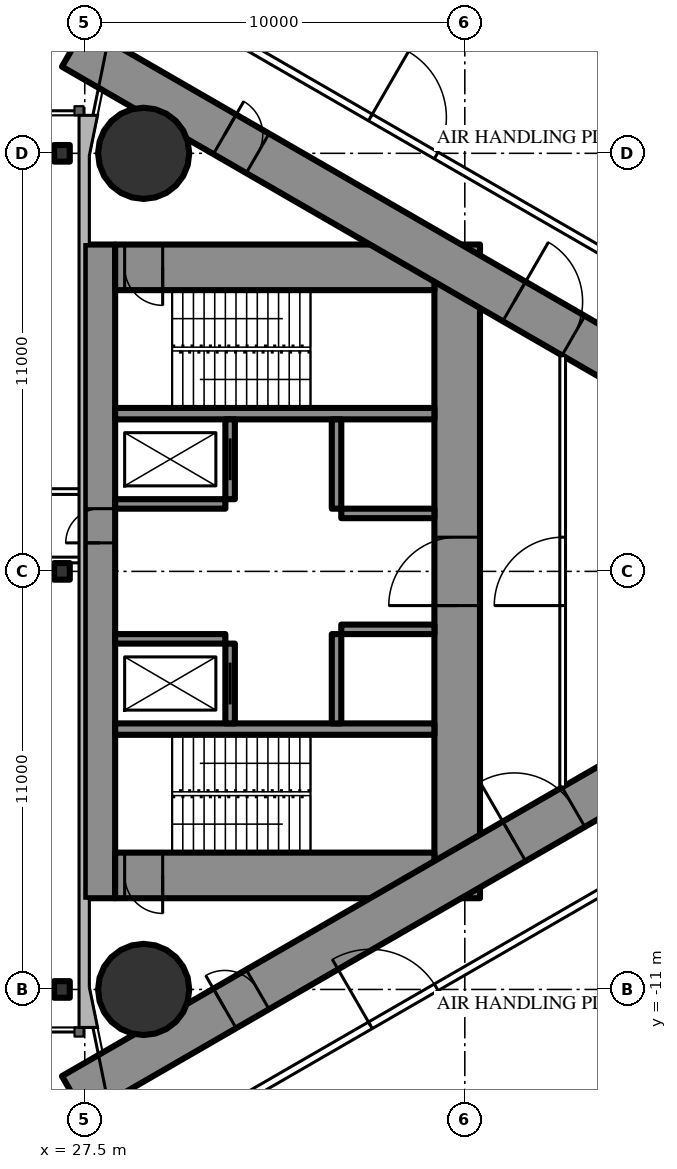
"""IFC4 building model, lengths in metres.
Left out: names, types, materials, properties, quantities, classifications, styles, units other than length and angle.
Written with IfcOpenShell. Run it as: python <this file> out.ifc"""

import sys

from ifc_helpers import new_model, si_unit, direction, frame, frame_2d, origin, origin_2d, place, context, subcontext, project, spatial, rectangle, circle, i_section, extrude, element, fill, save


model = new_model("IFC4")
c1 = context("Model", 3, precision=1e-05, world=origin(), true_north=direction((0.0, 1.0)))
c2 = subcontext(c1, "Body", "Model", "MODEL_VIEW")
j1 = project(units=[si_unit("LENGTHUNIT", "METRE"), si_unit("PLANEANGLEUNIT", "RADIAN")], contexts=[c1])
p1 = place(None, origin())
s1 = spatial("IfcSite", under=j1, at=p1, CompositionType="ELEMENT")
p2 = place(p1, origin())
s2 = spatial("IfcBuilding", under=s1, at=p2, CompositionType="ELEMENT")
p3 = place(p2, frame((0.0, 0.0, 263.3)))
s3 = spatial("IfcBuildingStorey", under=s2, at=p3, CompositionType="ELEMENT", Elevation=263.3)
for number, where, z_axis, x_axis in (
    (1, (29.05, 11.0, 0.0), (0.0, 0.0, 1.0), (1.0, 0.0, 0.0)),
    (2, (29.05, -11.0, 0.0), (0.0, 0.0, 1.0), (1.0, 0.0, 0.0)),
):
    element("IfcColumn", number, at=place(p3, frame(where, z_axis=z_axis, x_axis=x_axis)), inside=s3, PredefinedType="COLUMN", context=c2, shape_type="SweptSolid", body=[
        extrude(circle(Radius=1.2, at=origin_2d()), origin(), (0.0, 0.0, 1.0), 5.0),
    ])
p4 = place(p3, frame((27.9, -8.6, 0.0), z_axis=(0.0, 0.0, 1.0), x_axis=(0.0, 1.0, 0.0)))
e3 = element("IfcWall", 3, at=p4, inside=s3, PredefinedType="SHEAR", context=c2, shape_type="SweptSolid", body=[
    extrude(rectangle(XDim=17.2, YDim=0.8, at=frame_2d((8.6, 0.0))), origin(), (0.0, 0.0, 1.0), 5.0),
])
p5 = place(p4, frame((9.35, 0.0, 0.0)))
e4 = element("IfcOpeningElement", 4, at=p5, cuts=e3, PredefinedType="OPENING", context=c2, shape_type="SweptSolid", body=[
    extrude(rectangle(XDim=0.9, YDim=2.2, at=frame_2d((0.45, 1.1))), frame((0.0, 0.41, 0.0), z_axis=(0.0, -1.0, 0.0), x_axis=(1.0, 0.0, 0.0)), (0.0, 0.0, 1.0), 0.82),
])
p6 = place(p3, frame((37.3, -8.6, 0.0), z_axis=(0.0, 0.0, 1.0), x_axis=(0.0, 1.0, 0.0)))
e5 = element("IfcWall", 5, at=p6, inside=s3, PredefinedType="SHEAR", context=c2, shape_type="SweptSolid", body=[
    extrude(rectangle(XDim=17.2, YDim=1.2, at=frame_2d((8.6, 0.0))), origin(), (0.0, 0.0, 1.0), 5.0),
])
p7 = place(p6, frame((7.7, 0.0, 0.0)))
e6 = element("IfcOpeningElement", 6, at=p7, cuts=e5, PredefinedType="OPENING", context=c2, shape_type="SweptSolid", body=[
    extrude(rectangle(XDim=1.8, YDim=2.2, at=frame_2d((0.9, 1.1))), frame((0.0, 0.61, 0.0), z_axis=(0.0, -1.0, 0.0), x_axis=(1.0, 0.0, 0.0)), (0.0, 0.0, 1.0), 1.22),
])
p8 = place(p3, frame((28.3, -8.0, 0.0), z_axis=(0.0, 0.0, 1.0), x_axis=(1.0, 0.0, 0.0)))
e7 = element("IfcWall", 7, at=p8, inside=s3, PredefinedType="SHEAR", context=c2, shape_type="SweptSolid", body=[
    extrude(rectangle(XDim=8.4, YDim=1.2, at=frame_2d((4.2, 0.0))), origin(), (0.0, 0.0, 1.0), 5.0),
])
p9 = place(p8, frame((0.25, 0.0, 0.0)))
e8 = element("IfcOpeningElement", 8, at=p9, cuts=e7, PredefinedType="OPENING", context=c2, shape_type="SweptSolid", body=[
    extrude(rectangle(XDim=1.0, YDim=2.2, at=frame_2d((0.5, 1.1))), frame((0.0, 0.61, 0.0), z_axis=(0.0, -1.0, 0.0), x_axis=(1.0, 0.0, 0.0)), (0.0, 0.0, 1.0), 1.22),
])
p10 = place(p3, frame((28.3, 8.0, 0.0), z_axis=(0.0, 0.0, 1.0), x_axis=(1.0, 0.0, 0.0)))
e9 = element("IfcWall", 9, at=p10, inside=s3, PredefinedType="SHEAR", context=c2, shape_type="SweptSolid", body=[
    extrude(rectangle(XDim=8.4, YDim=1.2, at=frame_2d((4.2, 0.0))), origin(), (0.0, 0.0, 1.0), 5.0),
])
p11 = place(p10, frame((0.25, 0.0, 0.0)))
e10 = element("IfcOpeningElement", 10, at=p11, cuts=e9, PredefinedType="OPENING", context=c2, shape_type="SweptSolid", body=[
    extrude(rectangle(XDim=1.0, YDim=2.2, at=frame_2d((0.5, 1.1))), frame((0.0, 0.61, 0.0), z_axis=(0.0, -1.0, 0.0), x_axis=(1.0, 0.0, 0.0)), (0.0, 0.0, 1.0), 1.22),
])
for number, where, z_axis, x_axis in (
    (11, (28.3, -4.15, 0.0), (0.0, 0.0, 1.0), (1.0, 0.0, 0.0)),
    (12, (28.3, 4.15, 0.0), (0.0, 0.0, 1.0), (1.0, 0.0, 0.0)),
):
    element("IfcWall", number, at=place(p3, frame(where, z_axis=z_axis, x_axis=x_axis)), inside=s3, PredefinedType="SHEAR", context=c2, shape_type="SweptSolid", body=[
        extrude(rectangle(XDim=8.4, YDim=0.3, at=frame_2d((4.2, 0.0))), origin(), (0.0, 0.0, 1.0), 5.0),
    ])
p12 = place(p3, frame((31.325, -4.0, 0.0), z_axis=(0.0, 0.0, 1.0), x_axis=(0.0, 1.0, 0.0)))
e13 = element("IfcWall", 13, at=p12, inside=s3, PredefinedType="SHEAR", context=c2, shape_type="SweptSolid", body=[
    extrude(rectangle(XDim=2.1, YDim=0.25, at=frame_2d((1.05, 0.0))), origin(), (0.0, 0.0, 1.0), 5.0),
])
p13 = place(p12, frame((0.5, 0.0, 0.0)))
e14 = element("IfcOpeningElement", 14, at=p13, cuts=e13, PredefinedType="OPENING", context=c2, shape_type="SweptSolid", body=[
    extrude(rectangle(XDim=1.1, YDim=2.2, at=frame_2d((0.55, 1.1))), frame((0.0, 0.135, 0.0), z_axis=(0.0, -1.0, 0.0), x_axis=(1.0, 0.0, 0.0)), (0.0, 0.0, 1.0), 0.27),
])
p14 = place(p3, frame((34.125, -4.0, 0.0), z_axis=(0.0, 0.0, 1.0), x_axis=(0.0, 1.0, 0.0)))
e15 = element("IfcWall", 15, at=p14, inside=s3, PredefinedType="SHEAR", context=c2, shape_type="SweptSolid", body=[
    extrude(rectangle(XDim=2.35, YDim=0.25, at=frame_2d((1.175, 0.0))), origin(), (0.0, 0.0, 1.0), 5.0),
])
p15 = place(p3, frame((28.3, -1.775, 0.0), z_axis=(0.0, 0.0, 1.0), x_axis=(1.0, 0.0, 0.0)))
e16 = element("IfcWall", 16, at=p15, inside=s3, PredefinedType="SHEAR", context=c2, shape_type="SweptSolid", body=[
    extrude(rectangle(XDim=2.9, YDim=0.25, at=frame_2d((1.45, 0.0))), origin(), (0.0, 0.0, 1.0), 5.0),
])
p16 = place(p3, frame((34.25, -1.525, 0.0), z_axis=(0.0, 0.0, 1.0), x_axis=(1.0, 0.0, 0.0)))
e17 = element("IfcWall", 17, at=p16, inside=s3, PredefinedType="SHEAR", context=c2, shape_type="SweptSolid", body=[
    extrude(rectangle(XDim=2.45, YDim=0.25, at=frame_2d((1.225, 0.0))), origin(), (0.0, 0.0, 1.0), 5.0),
])
p17 = place(p3, frame((31.325, 1.9, 0.0), z_axis=(0.0, 0.0, 1.0), x_axis=(0.0, 1.0, 0.0)))
e18 = element("IfcWall", 18, at=p17, inside=s3, PredefinedType="SHEAR", context=c2, shape_type="SweptSolid", body=[
    extrude(rectangle(XDim=2.1, YDim=0.25, at=frame_2d((1.05, 0.0))), origin(), (0.0, 0.0, 1.0), 5.0),
])
p18 = place(p17, frame((0.5, 0.0, 0.0)))
e19 = element("IfcOpeningElement", 19, at=p18, cuts=e18, PredefinedType="OPENING", context=c2, shape_type="SweptSolid", body=[
    extrude(rectangle(XDim=1.1, YDim=2.2, at=frame_2d((0.55, 1.1))), frame((0.0, 0.135, 0.0), z_axis=(0.0, -1.0, 0.0), x_axis=(1.0, 0.0, 0.0)), (0.0, 0.0, 1.0), 0.27),
])
p19 = place(p3, frame((34.125, 1.65, 0.0), z_axis=(0.0, 0.0, 1.0), x_axis=(0.0, 1.0, 0.0)))
e20 = element("IfcWall", 20, at=p19, inside=s3, PredefinedType="SHEAR", context=c2, shape_type="SweptSolid", body=[
    extrude(rectangle(XDim=2.35, YDim=0.25, at=frame_2d((1.175, 0.0))), origin(), (0.0, 0.0, 1.0), 5.0),
])
p20 = place(p3, frame((28.3, 1.775, 0.0), z_axis=(0.0, 0.0, 1.0), x_axis=(1.0, 0.0, 0.0)))
e21 = element("IfcWall", 21, at=p20, inside=s3, PredefinedType="SHEAR", context=c2, shape_type="SweptSolid", body=[
    extrude(rectangle(XDim=2.9, YDim=0.25, at=frame_2d((1.45, 0.0))), origin(), (0.0, 0.0, 1.0), 5.0),
])
p21 = place(p3, frame((34.25, 1.525, 0.0), z_axis=(0.0, 0.0, 1.0), x_axis=(1.0, 0.0, 0.0)))
e22 = element("IfcWall", 22, at=p21, inside=s3, PredefinedType="SHEAR", context=c2, shape_type="SweptSolid", body=[
    extrude(rectangle(XDim=2.45, YDim=0.25, at=frame_2d((1.225, 0.0))), origin(), (0.0, 0.0, 1.0), 5.0),
])
p22 = place(p3, frame((27.2, -13.8, 0.0), z_axis=(0.0, 0.0, 1.0), x_axis=(0.866027159892, 0.499996958321, 0.0)))
e23 = element("IfcWall", 23, at=p22, inside=s3, PredefinedType="SHEAR", context=c2, shape_type="SweptSolid", body=[
    extrude(rectangle(XDim=27.947, YDim=1.2, at=frame_2d((13.973, 0.0))), origin(), (0.0, 0.0, 1.0), 5.0),
])
p23 = place(p22, frame((4.6, 0.0, 0.0)))
e24 = element("IfcOpeningElement", 24, at=p23, cuts=e23, PredefinedType="OPENING", context=c2, shape_type="SweptSolid", body=[
    extrude(rectangle(XDim=1.0, YDim=2.2, at=frame_2d((0.5, 1.1))), frame((0.0, 0.61, 0.0), z_axis=(0.0, -1.0, 0.0), x_axis=(1.0, 0.0, 0.0)), (0.0, 0.0, 1.0), 1.22),
])
p24 = place(p22, frame((13.395, 0.0, 0.0)))
e25 = element("IfcOpeningElement", 25, at=p24, cuts=e23, PredefinedType="OPENING", context=c2, shape_type="SweptSolid", body=[
    extrude(rectangle(XDim=1.8, YDim=2.2, at=frame_2d((0.9, 1.1))), frame((0.0, 0.61, 0.0), z_axis=(0.0, -1.0, 0.0), x_axis=(1.0, 0.0, 0.0)), (0.0, 0.0, 1.0), 1.22),
])
p25 = place(p3, frame((27.2, 13.8, 0.0), z_axis=(0.0, 0.0, 1.0), x_axis=(0.866024515034, -0.500001539357, 0.0)))
e26 = element("IfcWall", 26, at=p25, inside=s3, PredefinedType="SHEAR", context=c2, shape_type="SweptSolid", body=[
    extrude(rectangle(XDim=26.907, YDim=1.2, at=frame_2d((13.454, 0.0))), origin(), (0.0, 0.0, 1.0), 5.0),
])
p26 = place(p25, frame((4.6, 0.0, 0.0)))
e27 = element("IfcOpeningElement", 27, at=p26, cuts=e26, PredefinedType="OPENING", context=c2, shape_type="SweptSolid", body=[
    extrude(rectangle(XDim=1.0, YDim=2.2, at=frame_2d((0.5, 1.1))), frame((0.0, 0.61, 0.0), z_axis=(0.0, -1.0, 0.0), x_axis=(1.0, 0.0, 0.0)), (0.0, 0.0, 1.0), 1.22),
])
p27 = place(p25, frame((13.395, 0.0, 0.0)))
e28 = element("IfcOpeningElement", 28, at=p27, cuts=e26, PredefinedType="OPENING", context=c2, shape_type="SweptSolid", body=[
    extrude(rectangle(XDim=1.8, YDim=2.2, at=frame_2d((0.9, 1.1))), frame((0.0, 0.61, 0.0), z_axis=(0.0, -1.0, 0.0), x_axis=(1.0, 0.0, 0.0)), (0.0, 0.0, 1.0), 1.22),
])
for number, where, z_axis, x_axis in (
    (29, (26.9, -11.0, 0.0), (0.0, 0.0, 1.0), (1.0, 0.0, 0.0)),
    (30, (26.9, 0.0, 0.0), (0.0, 0.0, 1.0), (1.0, 0.0, 0.0)),
    (31, (26.9, 11.0, 0.0), (0.0, 0.0, 1.0), (1.0, 0.0, 0.0)),
):
    element("IfcColumn", number, at=place(p3, frame(where, z_axis=z_axis, x_axis=x_axis)), inside=s3, PredefinedType="COLUMN", context=c2, shape_type="SweptSolid", body=[
        extrude(i_section(OverallWidth=0.412, OverallDepth=0.437, WebThickness=0.036, FlangeThickness=0.058, FilletRadius=0.015, at=origin_2d()), origin(), (0.0, 0.0, 1.0), 5.0),
    ])
p28 = place(p3, frame((28.959, -15.44, 0.0), z_axis=(0.0, 0.0, 1.0), x_axis=(0.866025227435, 0.500000305447, 0.0)))
e32 = element("IfcWall", 32, at=p28, inside=s3, PredefinedType="PARTITIONING", context=c2, shape_type="SweptSolid", body=[
    extrude(rectangle(XDim=30.88, YDim=0.2, at=frame_2d((15.44, 0.0))), origin(), (0.0, 0.0, 1.0), 4.75),
])
p29 = place(p28, frame((6.994, 0.0, 0.0)))
e33 = element("IfcOpeningElement", 33, at=p29, cuts=e32, PredefinedType="OPENING", context=c2, shape_type="SweptSolid", body=[
    extrude(rectangle(XDim=2.0, YDim=2.4, at=frame_2d((1.0, 1.2))), frame((0.0, 0.11, 0.0), z_axis=(0.0, -1.0, 0.0), x_axis=(1.0, 0.0, 0.0)), (0.0, 0.0, 1.0), 0.22),
])
p30 = place(p28, frame((16.704, 0.0, 0.0)))
e34 = element("IfcOpeningElement", 34, at=p30, cuts=e32, PredefinedType="OPENING", context=c2, shape_type="SweptSolid", body=[
    extrude(rectangle(XDim=2.0, YDim=2.4, at=frame_2d((1.0, 1.2))), frame((0.0, 0.11, 0.0), z_axis=(0.0, -1.0, 0.0), x_axis=(1.0, 0.0, 0.0)), (0.0, 0.0, 1.0), 0.22),
])
p31 = place(p28, frame((20.587, 0.0, 0.0)))
e35 = element("IfcOpeningElement", 35, at=p31, cuts=e32, PredefinedType="OPENING", context=c2, shape_type="SweptSolid", body=[
    extrude(rectangle(XDim=2.0, YDim=2.4, at=frame_2d((1.0, 1.2))), frame((0.0, 0.11, 0.0), z_axis=(0.0, -1.0, 0.0), x_axis=(1.0, 0.0, 0.0)), (0.0, 0.0, 1.0), 0.22),
])
p32 = place(p28, frame((26.092, 0.0, 0.0)))
e36 = element("IfcOpeningElement", 36, at=p32, cuts=e32, PredefinedType="OPENING", context=c2, shape_type="SweptSolid", body=[
    extrude(rectangle(XDim=2.0, YDim=2.4, at=frame_2d((1.0, 1.2))), frame((0.0, 0.11, 0.0), z_axis=(0.0, -1.0, 0.0), x_axis=(1.0, 0.0, 0.0)), (0.0, 0.0, 1.0), 0.22),
])
p33 = place(p3, frame((28.959, 15.44, 0.0), z_axis=(0.0, 0.0, 1.0), x_axis=(0.866027378611, -0.499996579484, 0.0)))
e37 = element("IfcWall", 37, at=p33, inside=s3, PredefinedType="PARTITIONING", context=c2, shape_type="SweptSolid", body=[
    extrude(rectangle(XDim=30.76, YDim=0.2, at=frame_2d((15.38, 0.0))), origin(), (0.0, 0.0, 1.0), 4.75),
])
p34 = place(p33, frame((26.032, 0.0, 0.0)))
e38 = element("IfcOpeningElement", 38, at=p34, cuts=e37, PredefinedType="OPENING", context=c2, shape_type="SweptSolid", body=[
    extrude(rectangle(XDim=2.0, YDim=2.4, at=frame_2d((1.0, 1.2))), frame((0.0, 0.11, 0.0), z_axis=(0.0, -1.0, 0.0), x_axis=(1.0, 0.0, 0.0)), (0.0, 0.0, 1.0), 0.22),
])
p35 = place(p33, frame((20.587, 0.0, 0.0)))
e39 = element("IfcOpeningElement", 39, at=p35, cuts=e37, PredefinedType="OPENING", context=c2, shape_type="SweptSolid", body=[
    extrude(rectangle(XDim=2.0, YDim=2.4, at=frame_2d((1.0, 1.2))), frame((0.0, 0.11, 0.0), z_axis=(0.0, -1.0, 0.0), x_axis=(1.0, 0.0, 0.0)), (0.0, 0.0, 1.0), 0.22),
])
p36 = place(p33, frame((16.704, 0.0, 0.0)))
e40 = element("IfcOpeningElement", 40, at=p36, cuts=e37, PredefinedType="OPENING", context=c2, shape_type="SweptSolid", body=[
    extrude(rectangle(XDim=2.0, YDim=2.4, at=frame_2d((1.0, 1.2))), frame((0.0, 0.11, 0.0), z_axis=(0.0, -1.0, 0.0), x_axis=(1.0, 0.0, 0.0)), (0.0, 0.0, 1.0), 0.22),
])
p37 = place(p33, frame((6.994, 0.0, 0.0)))
e41 = element("IfcOpeningElement", 41, at=p37, cuts=e37, PredefinedType="OPENING", context=c2, shape_type="SweptSolid", body=[
    extrude(rectangle(XDim=2.0, YDim=2.4, at=frame_2d((1.0, 1.2))), frame((0.0, 0.11, 0.0), z_axis=(0.0, -1.0, 0.0), x_axis=(1.0, 0.0, 0.0)), (0.0, 0.0, 1.0), 0.22),
])
p38 = place(p3, frame((40.075, -5.674, 0.0), z_axis=(0.0, 0.0, 1.0), x_axis=(0.0, 1.0, 0.0)))
e42 = element("IfcWall", 42, at=p38, inside=s3, PredefinedType="PARTITIONING", context=c2, shape_type="SweptSolid", body=[
    extrude(rectangle(XDim=11.348, YDim=0.15, at=frame_2d((5.674, 0.0))), origin(), (0.0, 0.0, 1.0), 4.75),
])
p39 = place(p38, frame((4.774, 0.0, 0.0)))
e43 = element("IfcOpeningElement", 43, at=p39, cuts=e42, PredefinedType="OPENING", context=c2, shape_type="SweptSolid", body=[
    extrude(rectangle(XDim=1.8, YDim=2.2, at=frame_2d((0.9, 1.1))), frame((0.0, 0.085, 0.0), z_axis=(0.0, -1.0, 0.0), x_axis=(1.0, 0.0, 0.0)), (0.0, 0.0, 1.0), 0.17),
])
p40 = place(p3, frame((-27.5, 0.3, 0.0), z_axis=(0.0, 0.0, 1.0), x_axis=(1.0, 0.0, 0.0)))
e44 = element("IfcWall", 44, at=p40, inside=s3, PredefinedType="PARTITIONING", context=c2, shape_type="SweptSolid", body=[
    extrude(rectangle(XDim=55.0, YDim=0.15, at=frame_2d((27.5, 0.0))), origin(), (0.0, 0.0, 1.0), 3.8),
])
p41 = place(p40, frame((7.25, 0.0, 0.0)))
e45 = element("IfcOpeningElement", 45, at=p41, cuts=e44, PredefinedType="OPENING", context=c2, shape_type="SweptSolid", body=[
    extrude(rectangle(XDim=2.0, YDim=2.4, at=frame_2d((1.0, 1.2))), frame((0.0, 0.085, 0.0), z_axis=(0.0, -1.0, 0.0), x_axis=(1.0, 0.0, 0.0)), (0.0, 0.0, 1.0), 0.17),
])
p42 = place(p40, frame((29.25, 0.0, 0.0)))
e46 = element("IfcOpeningElement", 46, at=p42, cuts=e44, PredefinedType="OPENING", context=c2, shape_type="SweptSolid", body=[
    extrude(rectangle(XDim=2.0, YDim=2.4, at=frame_2d((1.0, 1.2))), frame((0.0, 0.085, 0.0), z_axis=(0.0, -1.0, 0.0), x_axis=(1.0, 0.0, 0.0)), (0.0, 0.0, 1.0), 0.17),
])
p43 = place(p40, frame((45.75, 0.0, 0.0)))
e47 = element("IfcOpeningElement", 47, at=p43, cuts=e44, PredefinedType="OPENING", context=c2, shape_type="SweptSolid", body=[
    extrude(rectangle(XDim=2.0, YDim=2.4, at=frame_2d((1.0, 1.2))), frame((0.0, 0.085, 0.0), z_axis=(0.0, -1.0, 0.0), x_axis=(1.0, 0.0, 0.0)), (0.0, 0.0, 1.0), 0.17),
])
p44 = place(p3, frame((-27.5, 2.1, 0.0), z_axis=(0.0, 0.0, 1.0), x_axis=(1.0, 0.0, 0.0)))
e48 = element("IfcWall", 48, at=p44, inside=s3, PredefinedType="PARTITIONING", context=c2, shape_type="SweptSolid", body=[
    extrude(rectangle(XDim=55.0, YDim=0.15, at=frame_2d((27.5, 0.0))), origin(), (0.0, 0.0, 1.0), 4.8),
])
p45 = place(p44, frame((7.25, 0.0, 0.0)))
e49 = element("IfcOpeningElement", 49, at=p45, cuts=e48, PredefinedType="OPENING", context=c2, shape_type="SweptSolid", body=[
    extrude(rectangle(XDim=2.0, YDim=2.4, at=frame_2d((1.0, 1.2))), frame((0.0, 0.085, 0.0), z_axis=(0.0, -1.0, 0.0), x_axis=(1.0, 0.0, 0.0)), (0.0, 0.0, 1.0), 0.17),
])
p46 = place(p44, frame((29.25, 0.0, 0.0)))
e50 = element("IfcOpeningElement", 50, at=p46, cuts=e48, PredefinedType="OPENING", context=c2, shape_type="SweptSolid", body=[
    extrude(rectangle(XDim=2.0, YDim=2.4, at=frame_2d((1.0, 1.2))), frame((0.0, 0.085, 0.0), z_axis=(0.0, -1.0, 0.0), x_axis=(1.0, 0.0, 0.0)), (0.0, 0.0, 1.0), 0.17),
])
p47 = place(p44, frame((45.75, 0.0, 0.0)))
e51 = element("IfcOpeningElement", 51, at=p47, cuts=e48, PredefinedType="OPENING", context=c2, shape_type="SweptSolid", body=[
    extrude(rectangle(XDim=2.0, YDim=2.4, at=frame_2d((1.0, 1.2))), frame((0.0, 0.085, 0.0), z_axis=(0.0, -1.0, 0.0), x_axis=(1.0, 0.0, 0.0)), (0.0, 0.0, 1.0), 0.17),
])
p48 = place(p29, origin())
e52 = element("IfcDoor", 52, at=p48, inside=s3, OperationType="DOUBLE_DOOR_SINGLE_SWING", PredefinedType="DOOR", context=c2, shape_type="SweptSolid", body=[
    extrude(rectangle(XDim=2.0, YDim=2.4, at=frame_2d((1.0, 1.2))), frame((0.0, 0.025, 0.0), z_axis=(0.0, -1.0, 0.0), x_axis=(1.0, 0.0, 0.0)), (0.0, 0.0, 1.0), 0.05),
])
fill(e33, e52)
p49 = place(p37, origin())
e53 = element("IfcDoor", 53, at=p49, inside=s3, OperationType="DOUBLE_DOOR_SINGLE_SWING", PredefinedType="DOOR", context=c2, shape_type="SweptSolid", body=[
    extrude(rectangle(XDim=2.0, YDim=2.4, at=frame_2d((1.0, 1.2))), frame((0.0, 0.025, 0.0), z_axis=(0.0, -1.0, 0.0), x_axis=(1.0, 0.0, 0.0)), (0.0, 0.0, 1.0), 0.05),
])
fill(e41, e53)
p50 = place(p39, origin())
e54 = element("IfcDoor", 54, at=p50, inside=s3, OperationType="DOUBLE_DOOR_SINGLE_SWING", PredefinedType="DOOR", context=c2, shape_type="SweptSolid", body=[
    extrude(rectangle(XDim=1.8, YDim=2.2, at=frame_2d((0.9, 1.1))), frame((0.0, 0.025, 0.0), z_axis=(0.0, -1.0, 0.0), x_axis=(1.0, 0.0, 0.0)), (0.0, 0.0, 1.0), 0.05),
])
fill(e43, e54)
p51 = place(p23, origin())
e55 = element("IfcDoor", 55, at=p51, inside=s3, OperationType="SINGLE_SWING_LEFT", PredefinedType="DOOR", context=c2, shape_type="SweptSolid", body=[
    extrude(rectangle(XDim=1.0, YDim=2.2, at=frame_2d((0.5, 1.1))), frame((0.0, 0.025, 0.0), z_axis=(0.0, -1.0, 0.0), x_axis=(1.0, 0.0, 0.0)), (0.0, 0.0, 1.0), 0.05),
])
fill(e24, e55)
p52 = place(p24, origin())
e56 = element("IfcDoor", 56, at=p52, inside=s3, OperationType="DOUBLE_DOOR_SINGLE_SWING", PredefinedType="DOOR", context=c2, shape_type="SweptSolid", body=[
    extrude(rectangle(XDim=1.8, YDim=2.2, at=frame_2d((0.9, 1.1))), frame((0.0, 0.025, 0.0), z_axis=(0.0, -1.0, 0.0), x_axis=(1.0, 0.0, 0.0)), (0.0, 0.0, 1.0), 0.05),
])
fill(e25, e56)
p53 = place(p26, origin())
e57 = element("IfcDoor", 57, at=p53, inside=s3, OperationType="SINGLE_SWING_LEFT", PredefinedType="DOOR", context=c2, shape_type="SweptSolid", body=[
    extrude(rectangle(XDim=1.0, YDim=2.2, at=frame_2d((0.5, 1.1))), frame((0.0, 0.025, 0.0), z_axis=(0.0, -1.0, 0.0), x_axis=(1.0, 0.0, 0.0)), (0.0, 0.0, 1.0), 0.05),
])
fill(e27, e57)
p54 = place(p27, origin())
e58 = element("IfcDoor", 58, at=p54, inside=s3, OperationType="DOUBLE_DOOR_SINGLE_SWING", PredefinedType="DOOR", context=c2, shape_type="SweptSolid", body=[
    extrude(rectangle(XDim=1.8, YDim=2.2, at=frame_2d((0.9, 1.1))), frame((0.0, 0.025, 0.0), z_axis=(0.0, -1.0, 0.0), x_axis=(1.0, 0.0, 0.0)), (0.0, 0.0, 1.0), 0.05),
])
fill(e28, e58)
p55 = place(p7, origin())
e59 = element("IfcDoor", 59, at=p55, inside=s3, OperationType="DOUBLE_DOOR_SINGLE_SWING", PredefinedType="DOOR", context=c2, shape_type="SweptSolid", body=[
    extrude(rectangle(XDim=1.8, YDim=2.2, at=frame_2d((0.9, 1.1))), frame((0.0, 0.025, 0.0), z_axis=(0.0, -1.0, 0.0), x_axis=(1.0, 0.0, 0.0)), (0.0, 0.0, 1.0), 0.05),
])
fill(e6, e59)
p56 = place(p9, origin())
e60 = element("IfcDoor", 60, at=p56, inside=s3, OperationType="SINGLE_SWING_RIGHT", PredefinedType="DOOR", context=c2, shape_type="SweptSolid", body=[
    extrude(rectangle(XDim=1.0, YDim=2.2, at=frame_2d((0.5, 1.1))), frame((0.0, 0.025, 0.0), z_axis=(0.0, -1.0, 0.0), x_axis=(1.0, 0.0, 0.0)), (0.0, 0.0, 1.0), 0.05),
])
fill(e8, e60)
p57 = place(p11, origin())
e61 = element("IfcDoor", 61, at=p57, inside=s3, OperationType="SINGLE_SWING_RIGHT", PredefinedType="DOOR", context=c2, shape_type="SweptSolid", body=[
    extrude(rectangle(XDim=1.0, YDim=2.2, at=frame_2d((0.5, 1.1))), frame((0.0, 0.025, 0.0), z_axis=(0.0, -1.0, 0.0), x_axis=(1.0, 0.0, 0.0)), (0.0, 0.0, 1.0), 0.05),
])
fill(e10, e61)
p58 = place(p5, origin())
e62 = element("IfcDoor", 62, at=p58, inside=s3, OperationType="SINGLE_SWING_LEFT", PredefinedType="DOOR", context=c2, shape_type="SweptSolid", body=[
    extrude(rectangle(XDim=0.9, YDim=2.2, at=frame_2d((0.45, 1.1))), frame((0.0, 0.025, 0.0), z_axis=(0.0, -1.0, 0.0), x_axis=(1.0, 0.0, 0.0)), (0.0, 0.0, 1.0), 0.05),
])
fill(e4, e62)
p59 = place(p13, origin())
e63 = element("IfcDoor", 63, at=p59, inside=s3, OperationType="SLIDING_TO_LEFT", PredefinedType="USERDEFINED", context=c2, shape_type="SweptSolid", body=[
    extrude(rectangle(XDim=1.1, YDim=2.2, at=frame_2d((0.55, 1.1))), frame((0.0, 0.025, 0.0), z_axis=(0.0, -1.0, 0.0), x_axis=(1.0, 0.0, 0.0)), (0.0, 0.0, 1.0), 0.05),
])
fill(e14, e63)
p60 = place(p18, origin())
e64 = element("IfcDoor", 64, at=p60, inside=s3, OperationType="SLIDING_TO_LEFT", PredefinedType="USERDEFINED", context=c2, shape_type="SweptSolid", body=[
    extrude(rectangle(XDim=1.1, YDim=2.2, at=frame_2d((0.55, 1.1))), frame((0.0, 0.025, 0.0), z_axis=(0.0, -1.0, 0.0), x_axis=(1.0, 0.0, 0.0)), (0.0, 0.0, 1.0), 0.05),
])
fill(e19, e64)
save(model, sys.argv[1])
